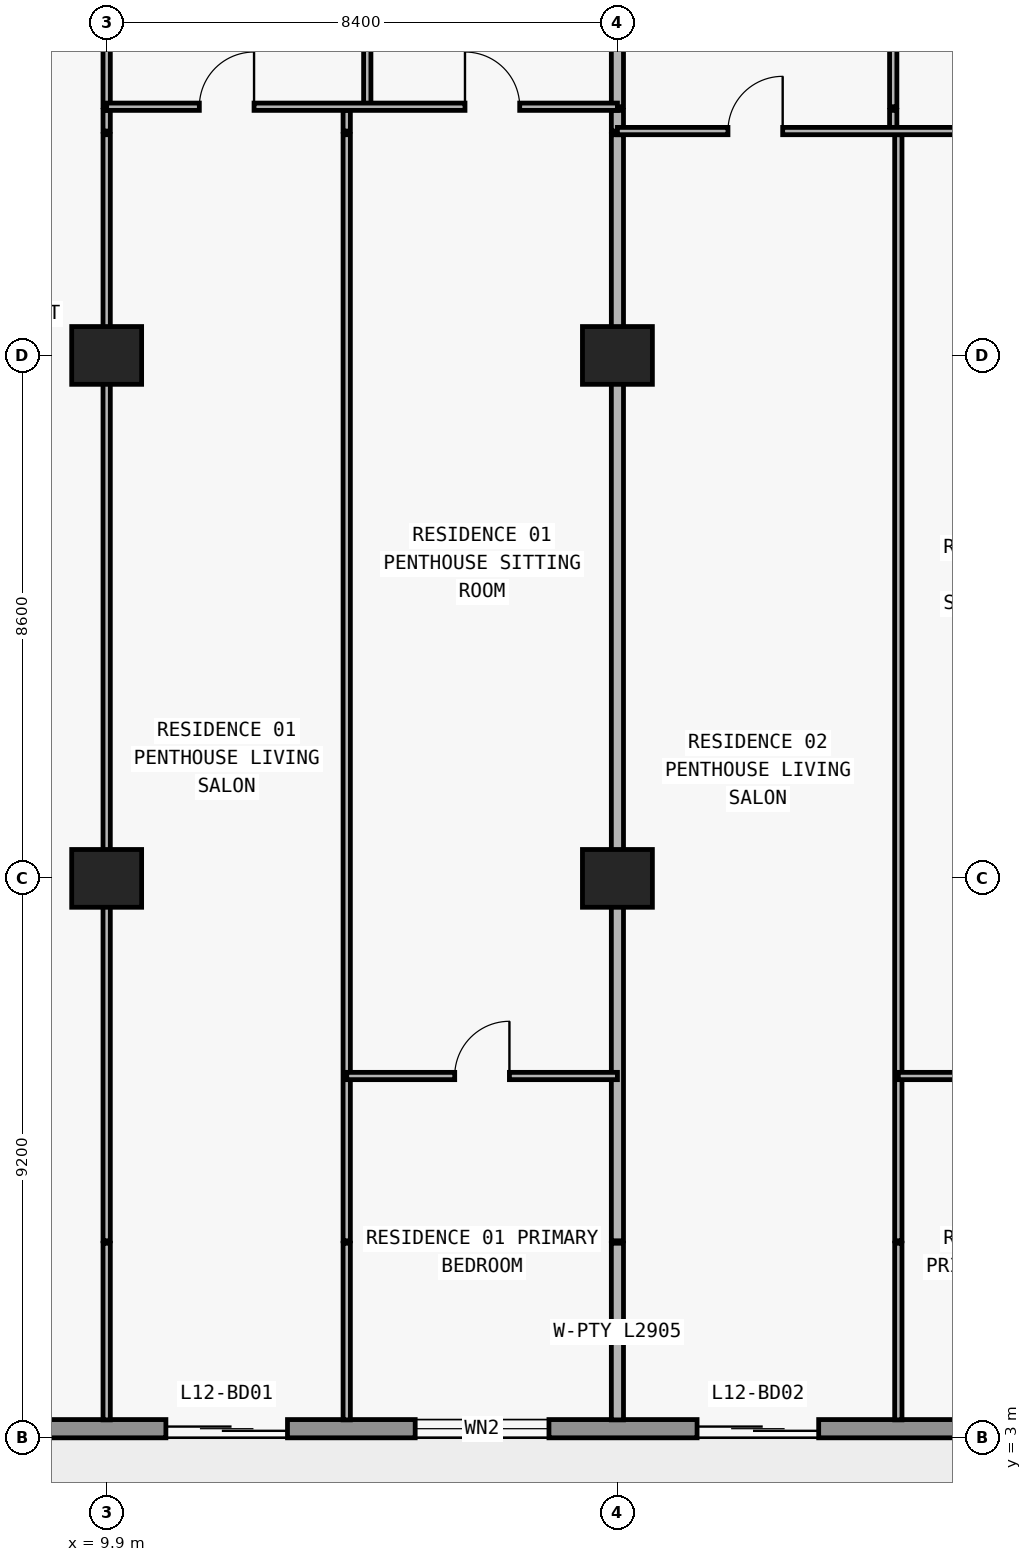
"""IFC4 building model, lengths in metres.
Left out: names, types, materials, properties, quantities, classifications, styles, units other than length and angle.
Written with IfcOpenShell. Run it as: python <this file> out.ifc"""

import sys

from ifc_helpers import new_model, si_unit, direction, frame, frame_2d, origin, origin_2d, place, context, subcontext, project, spatial, rectangle, extrude, element, fill, save


model = new_model("IFC4")
c1 = context("Model", 3, precision=1e-05, world=origin(), true_north=direction((0.0, 1.0)))
c2 = subcontext(c1, "Body", "Model", "MODEL_VIEW")
j1 = project(units=[si_unit("LENGTHUNIT", "METRE"), si_unit("PLANEANGLEUNIT", "RADIAN")], contexts=[c1])
p1 = place(None, origin())
s1 = spatial("IfcSite", under=j1, at=p1, CompositionType="ELEMENT")
p2 = place(p1, origin())
s2 = spatial("IfcBuilding", under=s1, at=p2, CompositionType="ELEMENT")
p3 = place(p2, frame((0.0, 0.0, 49.8)))
s3 = spatial("IfcBuildingStorey", under=s2, at=p3, CompositionType="ELEMENT", Elevation=49.8)
for number, where, z_axis, x_axis in (
    (1, (9.9, 12.2, 0.0), (0.0, 0.0, 1.0), (1.0, 0.0, 0.0)),
    (2, (18.3, 12.2, 0.0), (0.0, 0.0, 1.0), (1.0, 0.0, 0.0)),
    (3, (9.9, 20.8, 0.0), (0.0, 0.0, 1.0), (1.0, 0.0, 0.0)),
    (4, (18.3, 20.8, 0.0), (0.0, 0.0, 1.0), (1.0, 0.0, 0.0)),
):
    element("IfcColumn", number, at=place(p3, frame(where, z_axis=z_axis, x_axis=x_axis)), inside=s3, PredefinedType="COLUMN", context=c2, shape_type="SweptSolid", body=[
        extrude(rectangle(XDim=1.15, YDim=0.95, at=origin_2d()), origin(), (0.0, 0.0, 1.0), 3.05),
    ])
p4 = place(p3, frame((72.7, 3.15, 0.0), z_axis=(0.0, 0.0, 1.0), x_axis=(-1.0, 0.0, 0.0)))
e5 = element("IfcWall", 5, at=p4, inside=s3, PredefinedType="STANDARD", context=c2, shape_type="SweptSolid", body=[
    extrude(rectangle(XDim=67.6, YDim=0.3, at=frame_2d((33.8, 0.0))), origin(), (0.0, 0.0, 1.0), 3.05),
])
p5 = place(p4, frame((59.826, 0.0, 0.0)))
e6 = element("IfcOpeningElement", 6, at=p5, cuts=e5, PredefinedType="OPENING", context=c2, shape_type="SweptSolid", body=[
    extrude(rectangle(XDim=2.0, YDim=2.3, at=frame_2d((1.0, 1.15))), frame((0.0, 0.16, 0.0), z_axis=(0.0, -1.0, 0.0), x_axis=(1.0, 0.0, 0.0)), (0.0, 0.0, 1.0), 0.32),
])
p6 = place(p4, frame((55.526, 0.0, 0.85)))
e7 = element("IfcOpeningElement", 7, at=p6, cuts=e5, PredefinedType="OPENING", context=c2, shape_type="SweptSolid", body=[
    extrude(rectangle(XDim=2.2, YDim=1.55, at=frame_2d((1.1, 0.775))), frame((0.0, 0.16, 0.0), z_axis=(0.0, -1.0, 0.0), x_axis=(1.0, 0.0, 0.0)), (0.0, 0.0, 1.0), 0.32),
])
p7 = place(p4, frame((51.09, 0.0, 0.0)))
e8 = element("IfcOpeningElement", 8, at=p7, cuts=e5, PredefinedType="OPENING", context=c2, shape_type="SweptSolid", body=[
    extrude(rectangle(XDim=2.0, YDim=2.3, at=frame_2d((1.0, 1.15))), frame((0.0, 0.16, 0.0), z_axis=(0.0, -1.0, 0.0), x_axis=(1.0, 0.0, 0.0)), (0.0, 0.0, 1.0), 0.32),
])
p8 = place(p4, frame((46.99, 0.0, 0.85)))
e9 = element("IfcOpeningElement", 9, at=p8, cuts=e5, PredefinedType="OPENING", context=c2, shape_type="SweptSolid", body=[
    extrude(rectangle(XDim=1.8, YDim=1.55, at=frame_2d((0.9, 0.775))), frame((0.0, 0.16, 0.0), z_axis=(0.0, -1.0, 0.0), x_axis=(1.0, 0.0, 0.0)), (0.0, 0.0, 1.0), 0.32),
])
p9 = place(p4, frame((43.09, 0.0, 0.0)))
e10 = element("IfcOpeningElement", 10, at=p9, cuts=e5, PredefinedType="OPENING", context=c2, shape_type="SweptSolid", body=[
    extrude(rectangle(XDim=2.0, YDim=2.3, at=frame_2d((1.0, 1.15))), frame((0.0, 0.16, 0.0), z_axis=(0.0, -1.0, 0.0), x_axis=(1.0, 0.0, 0.0)), (0.0, 0.0, 1.0), 0.32),
])
p10 = place(p4, frame((38.41, 0.0, 0.65)))
e11 = element("IfcOpeningElement", 11, at=p10, cuts=e5, PredefinedType="OPENING", context=c2, shape_type="SweptSolid", body=[
    extrude(rectangle(XDim=2.6, YDim=1.85, at=frame_2d((1.3, 0.925))), frame((0.0, 0.16, 0.0), z_axis=(0.0, -1.0, 0.0), x_axis=(1.0, 0.0, 0.0)), (0.0, 0.0, 1.0), 0.32),
])
p11 = place(p4, frame((32.7, 0.0, 0.85)))
e12 = element("IfcOpeningElement", 12, at=p11, cuts=e5, PredefinedType="OPENING", context=c2, shape_type="SweptSolid", body=[
    extrude(rectangle(XDim=2.2, YDim=1.55, at=frame_2d((1.1, 0.775))), frame((0.0, 0.16, 0.0), z_axis=(0.0, -1.0, 0.0), x_axis=(1.0, 0.0, 0.0)), (0.0, 0.0, 1.0), 0.32),
])
p12 = place(p4, frame((24.7, 0.0, 0.85)))
e13 = element("IfcOpeningElement", 13, at=p12, cuts=e5, PredefinedType="OPENING", context=c2, shape_type="SweptSolid", body=[
    extrude(rectangle(XDim=2.2, YDim=1.55, at=frame_2d((1.1, 0.775))), frame((0.0, 0.16, 0.0), z_axis=(0.0, -1.0, 0.0), x_axis=(1.0, 0.0, 0.0)), (0.0, 0.0, 1.0), 0.32),
])
p13 = place(p4, frame((18.29, 0.0, 0.0)))
e14 = element("IfcOpeningElement", 14, at=p13, cuts=e5, PredefinedType="OPENING", context=c2, shape_type="SweptSolid", body=[
    extrude(rectangle(XDim=2.0, YDim=2.3, at=frame_2d((1.0, 1.15))), frame((0.0, 0.16, 0.0), z_axis=(0.0, -1.0, 0.0), x_axis=(1.0, 0.0, 0.0)), (0.0, 0.0, 1.0), 0.32),
])
p14 = place(p4, frame((14.19, 0.0, 0.85)))
e15 = element("IfcOpeningElement", 15, at=p14, cuts=e5, PredefinedType="OPENING", context=c2, shape_type="SweptSolid", body=[
    extrude(rectangle(XDim=1.8, YDim=1.55, at=frame_2d((0.9, 0.775))), frame((0.0, 0.16, 0.0), z_axis=(0.0, -1.0, 0.0), x_axis=(1.0, 0.0, 0.0)), (0.0, 0.0, 1.0), 0.32),
])
p15 = place(p4, frame((10.226, 0.0, 0.0)))
e16 = element("IfcOpeningElement", 16, at=p15, cuts=e5, PredefinedType="OPENING", context=c2, shape_type="SweptSolid", body=[
    extrude(rectangle(XDim=2.0, YDim=2.3, at=frame_2d((1.0, 1.15))), frame((0.0, 0.16, 0.0), z_axis=(0.0, -1.0, 0.0), x_axis=(1.0, 0.0, 0.0)), (0.0, 0.0, 1.0), 0.32),
])
p16 = place(p4, frame((5.926, 0.0, 0.85)))
e17 = element("IfcOpeningElement", 17, at=p16, cuts=e5, PredefinedType="OPENING", context=c2, shape_type="SweptSolid", body=[
    extrude(rectangle(XDim=2.2, YDim=1.55, at=frame_2d((1.1, 0.775))), frame((0.0, 0.16, 0.0), z_axis=(0.0, -1.0, 0.0), x_axis=(1.0, 0.0, 0.0)), (0.0, 0.0, 1.0), 0.32),
])
p17 = place(p3, frame((9.9, 3.295, 0.0), z_axis=(0.0, 0.0, 1.0), x_axis=(0.0, 1.0, 0.0)))
e18 = element("IfcWall", 18, at=p17, inside=s3, PredefinedType="PARTITIONING", context=c2, shape_type="SweptSolid", body=[
    extrude(rectangle(XDim=2.905, YDim=0.12, at=frame_2d((1.453, 0.0))), origin(), (0.0, 0.0, 1.0), 3.05),
])
p18 = place(p3, frame((9.9, 6.24, 0.0), z_axis=(0.0, 0.0, 1.0), x_axis=(0.0, 1.0, 0.0)))
e19 = element("IfcWall", 19, at=p18, inside=s3, PredefinedType="PARTITIONING", context=c2, shape_type="SweptSolid", body=[
    extrude(rectangle(XDim=18.19, YDim=0.12, at=frame_2d((9.095, 0.0))), origin(), (0.0, 0.0, 1.0), 2.11),
])
p19 = place(p3, frame((9.9, 24.49, 0.0), z_axis=(0.0, 0.0, 1.0), x_axis=(0.0, 1.0, 0.0)))
e20 = element("IfcWall", 20, at=p19, inside=s3, PredefinedType="PARTITIONING", context=c2, shape_type="SweptSolid", body=[
    extrude(rectangle(XDim=0.34, YDim=0.12, at=frame_2d((0.17, 0.0))), origin(), (0.0, 0.0, 1.0), 2.11),
])
p20 = place(p3, frame((9.9, 24.89, 0.0), z_axis=(0.0, 0.0, 1.0), x_axis=(0.0, 1.0, 0.0)))
e21 = element("IfcWall", 21, at=p20, inside=s3, PredefinedType="PARTITIONING", context=c2, shape_type="SweptSolid", body=[
    extrude(rectangle(XDim=4.69, YDim=0.12, at=frame_2d((2.345, 0.0))), origin(), (0.0, 0.0, 1.0), 2.11),
])
p21 = place(p20, frame((1.895, 0.0, 0.0)))
e22 = element("IfcOpeningElement", 22, at=p21, cuts=e21, PredefinedType="OPENING", context=c2, shape_type="SweptSolid", body=[
    extrude(rectangle(XDim=0.9, YDim=2.06, at=frame_2d((0.45, 1.03))), frame((0.0, 0.07, 0.0), z_axis=(0.0, -1.0, 0.0), x_axis=(1.0, 0.0, 0.0)), (0.0, 0.0, 1.0), 0.14),
])
p22 = place(p3, frame((13.848, 3.295, 0.0), z_axis=(0.0, 0.0, 1.0), x_axis=(0.0, 1.0, 0.0)))
e23 = element("IfcWall", 23, at=p22, inside=s3, PredefinedType="PARTITIONING", context=c2, shape_type="SweptSolid", body=[
    extrude(rectangle(XDim=2.905, YDim=0.12, at=frame_2d((1.453, 0.0))), origin(), (0.0, 0.0, 1.0), 3.05),
])
p23 = place(p3, frame((13.848, 6.24, 0.0), z_axis=(0.0, 0.0, 1.0), x_axis=(0.0, 1.0, 0.0)))
e24 = element("IfcWall", 24, at=p23, inside=s3, PredefinedType="PARTITIONING", context=c2, shape_type="SweptSolid", body=[
    extrude(rectangle(XDim=18.19, YDim=0.12, at=frame_2d((9.095, 0.0))), origin(), (0.0, 0.0, 1.0), 3.05),
])
p24 = place(p3, frame((13.848, 24.49, 0.0), z_axis=(0.0, 0.0, 1.0), x_axis=(0.0, 1.0, 0.0)))
e25 = element("IfcWall", 25, at=p24, inside=s3, PredefinedType="PARTITIONING", context=c2, shape_type="SweptSolid", body=[
    extrude(rectangle(XDim=0.34, YDim=0.12, at=frame_2d((0.17, 0.0))), origin(), (0.0, 0.0, 1.0), 3.05),
])
p25 = place(p3, frame((14.186, 24.89, 0.0), z_axis=(0.0, 0.0, 1.0), x_axis=(0.0, 1.0, 0.0)))
e26 = element("IfcWall", 26, at=p25, inside=s3, PredefinedType="PARTITIONING", context=c2, shape_type="SweptSolid", body=[
    extrude(rectangle(XDim=4.69, YDim=0.12, at=frame_2d((2.345, 0.0))), origin(), (0.0, 0.0, 1.0), 3.05),
])
p26 = place(p25, frame((1.895, 0.0, 0.0)))
e27 = element("IfcOpeningElement", 27, at=p26, cuts=e26, PredefinedType="OPENING", context=c2, shape_type="SweptSolid", body=[
    extrude(rectangle(XDim=0.9, YDim=2.15, at=frame_2d((0.45, 1.075))), frame((0.0, 0.07, 0.0), z_axis=(0.0, -1.0, 0.0), x_axis=(1.0, 0.0, 0.0)), (0.0, 0.0, 1.0), 0.14),
])
p27 = place(p3, frame((18.3, 3.295, 0.0), z_axis=(0.0, 0.0, 1.0), x_axis=(0.0, 1.0, 0.0)))
e28 = element("IfcWall", 28, at=p27, inside=s3, PredefinedType="PARTITIONING", context=c2, shape_type="SweptSolid", body=[
    extrude(rectangle(XDim=2.905, YDim=0.2, at=frame_2d((1.453, 0.0))), origin(), (0.0, 0.0, 1.0), 3.05),
])
p28 = place(p3, frame((18.3, 6.24, 0.0), z_axis=(0.0, 0.0, 1.0), x_axis=(0.0, 1.0, 0.0)))
e29 = element("IfcWall", 29, at=p28, inside=s3, PredefinedType="PARTITIONING", context=c2, shape_type="SweptSolid", body=[
    extrude(rectangle(XDim=18.19, YDim=0.2, at=frame_2d((9.095, 0.0))), origin(), (0.0, 0.0, 1.0), 2.11),
])
p29 = place(p3, frame((18.3, 24.49, 0.0), z_axis=(0.0, 0.0, 1.0), x_axis=(0.0, 1.0, 0.0)))
e30 = element("IfcWall", 30, at=p29, inside=s3, PredefinedType="PARTITIONING", context=c2, shape_type="SweptSolid", body=[
    extrude(rectangle(XDim=0.34, YDim=0.2, at=frame_2d((0.17, 0.0))), origin(), (0.0, 0.0, 1.0), 2.11),
])
p30 = place(p3, frame((18.3, 24.89, 0.0), z_axis=(0.0, 0.0, 1.0), x_axis=(0.0, 1.0, 0.0)))
e31 = element("IfcWall", 31, at=p30, inside=s3, PredefinedType="PARTITIONING", context=c2, shape_type="SweptSolid", body=[
    extrude(rectangle(XDim=4.69, YDim=0.2, at=frame_2d((2.345, 0.0))), origin(), (0.0, 0.0, 1.0), 2.11),
])
p31 = place(p3, frame((22.836, 24.49, 0.0), z_axis=(0.0, 0.0, 1.0), x_axis=(0.0, 1.0, 0.0)))
e32 = element("IfcWall", 32, at=p31, inside=s3, PredefinedType="PARTITIONING", context=c2, shape_type="SweptSolid", body=[
    extrude(rectangle(XDim=0.34, YDim=0.12, at=frame_2d((0.17, 0.0))), origin(), (0.0, 0.0, 1.0), 3.05),
])
p32 = place(p3, frame((22.836, 24.89, 0.0), z_axis=(0.0, 0.0, 1.0), x_axis=(0.0, 1.0, 0.0)))
e33 = element("IfcWall", 33, at=p32, inside=s3, PredefinedType="PARTITIONING", context=c2, shape_type="SweptSolid", body=[
    extrude(rectangle(XDim=4.69, YDim=0.12, at=frame_2d((2.345, 0.0))), origin(), (0.0, 0.0, 1.0), 3.05),
])
p33 = place(p32, frame((1.895, 0.0, 0.0)))
e34 = element("IfcOpeningElement", 34, at=p33, cuts=e33, PredefinedType="OPENING", context=c2, shape_type="SweptSolid", body=[
    extrude(rectangle(XDim=0.9, YDim=2.15, at=frame_2d((0.45, 1.075))), frame((0.0, 0.07, 0.0), z_axis=(0.0, -1.0, 0.0), x_axis=(1.0, 0.0, 0.0)), (0.0, 0.0, 1.0), 0.14),
])
p34 = place(p3, frame((22.92, 3.295, 0.0), z_axis=(0.0, 0.0, 1.0), x_axis=(0.0, 1.0, 0.0)))
e35 = element("IfcWall", 35, at=p34, inside=s3, PredefinedType="PARTITIONING", context=c2, shape_type="SweptSolid", body=[
    extrude(rectangle(XDim=2.905, YDim=0.12, at=frame_2d((1.453, 0.0))), origin(), (0.0, 0.0, 1.0), 3.05),
])
p35 = place(p3, frame((22.92, 6.24, 0.0), z_axis=(0.0, 0.0, 1.0), x_axis=(0.0, 1.0, 0.0)))
e36 = element("IfcWall", 36, at=p35, inside=s3, PredefinedType="PARTITIONING", context=c2, shape_type="SweptSolid", body=[
    extrude(rectangle(XDim=18.19, YDim=0.12, at=frame_2d((9.095, 0.0))), origin(), (0.0, 0.0, 1.0), 3.05),
])
p36 = place(p3, frame((13.848, 8.95, 0.0), z_axis=(0.0, 0.0, 1.0), x_axis=(1.0, 0.0, 0.0)))
e37 = element("IfcWall", 37, at=p36, inside=s3, PredefinedType="PARTITIONING", context=c2, shape_type="SweptSolid", body=[
    extrude(rectangle(XDim=4.452, YDim=0.12, at=frame_2d((2.226, 0.0))), origin(), (0.0, 0.0, 1.0), 3.05),
])
p37 = place(p36, frame((1.776, 0.0, 0.0)))
e38 = element("IfcOpeningElement", 38, at=p37, cuts=e37, PredefinedType="OPENING", context=c2, shape_type="SweptSolid", body=[
    extrude(rectangle(XDim=0.9, YDim=2.15, at=frame_2d((0.45, 1.075))), frame((0.0, 0.07, 0.0), z_axis=(0.0, -1.0, 0.0), x_axis=(1.0, 0.0, 0.0)), (0.0, 0.0, 1.0), 0.14),
])
p38 = place(p3, frame((22.92, 8.95, 0.0), z_axis=(0.0, 0.0, 1.0), x_axis=(1.0, 0.0, 0.0)))
e39 = element("IfcWall", 39, at=p38, inside=s3, PredefinedType="PARTITIONING", context=c2, shape_type="SweptSolid", body=[
    extrude(rectangle(XDim=3.78, YDim=0.12, at=frame_2d((1.89, 0.0))), origin(), (0.0, 0.0, 1.0), 3.05),
])
p39 = place(p38, frame((1.44, 0.0, 0.0)))
e40 = element("IfcOpeningElement", 40, at=p39, cuts=e39, PredefinedType="OPENING", context=c2, shape_type="SweptSolid", body=[
    extrude(rectangle(XDim=0.9, YDim=2.15, at=frame_2d((0.45, 1.075))), frame((0.0, 0.07, 0.0), z_axis=(0.0, -1.0, 0.0), x_axis=(1.0, 0.0, 0.0)), (0.0, 0.0, 1.0), 0.14),
])
p40 = place(p3, frame((18.3, 24.49, 0.0), z_axis=(0.0, 0.0, 1.0), x_axis=(1.0, 0.0, 0.0)))
e41 = element("IfcWall", 41, at=p40, inside=s3, PredefinedType="PARTITIONING", context=c2, shape_type="SweptSolid", body=[
    extrude(rectangle(XDim=8.13, YDim=0.12, at=frame_2d((4.065, 0.0))), origin(), (0.0, 0.0, 1.0), 3.05),
])
p41 = place(p40, frame((1.818, 0.0, 0.0)))
e42 = element("IfcOpeningElement", 42, at=p41, cuts=e41, PredefinedType="OPENING", context=c2, shape_type="SweptSolid", body=[
    extrude(rectangle(XDim=0.9, YDim=2.15, at=frame_2d((0.45, 1.075))), frame((0.0, 0.07, 0.0), z_axis=(0.0, -1.0, 0.0), x_axis=(1.0, 0.0, 0.0)), (0.0, 0.0, 1.0), 0.14),
])
p42 = place(p40, frame((5.925, 0.0, 0.0)))
e43 = element("IfcOpeningElement", 43, at=p42, cuts=e41, PredefinedType="OPENING", context=c2, shape_type="SweptSolid", body=[
    extrude(rectangle(XDim=0.9, YDim=2.15, at=frame_2d((0.45, 1.075))), frame((0.0, 0.07, 0.0), z_axis=(0.0, -1.0, 0.0), x_axis=(1.0, 0.0, 0.0)), (0.0, 0.0, 1.0), 0.14),
])
p43 = place(p3, frame((9.9, 24.89, 0.0), z_axis=(0.0, 0.0, 1.0), x_axis=(1.0, 0.0, 0.0)))
e44 = element("IfcWall", 44, at=p43, inside=s3, PredefinedType="PARTITIONING", context=c2, shape_type="SweptSolid", body=[
    extrude(rectangle(XDim=8.4, YDim=0.12, at=frame_2d((4.2, 0.0))), origin(), (0.0, 0.0, 1.0), 3.05),
])
p44 = place(p43, frame((1.524, 0.0, 0.0)))
e45 = element("IfcOpeningElement", 45, at=p44, cuts=e44, PredefinedType="OPENING", context=c2, shape_type="SweptSolid", body=[
    extrude(rectangle(XDim=0.9, YDim=2.15, at=frame_2d((0.45, 1.075))), frame((0.0, 0.07, 0.0), z_axis=(0.0, -1.0, 0.0), x_axis=(1.0, 0.0, 0.0)), (0.0, 0.0, 1.0), 0.14),
])
p45 = place(p43, frame((5.893, 0.0, 0.0)))
e46 = element("IfcOpeningElement", 46, at=p45, cuts=e44, PredefinedType="OPENING", context=c2, shape_type="SweptSolid", body=[
    extrude(rectangle(XDim=0.9, YDim=2.15, at=frame_2d((0.45, 1.075))), frame((0.0, 0.07, 0.0), z_axis=(0.0, -1.0, 0.0), x_axis=(1.0, 0.0, 0.0)), (0.0, 0.0, 1.0), 0.14),
])
p46 = place(p5, origin())
e47 = element("IfcDoor", 47, at=p46, inside=s3, OperationType="DOUBLE_DOOR_SLIDING", PredefinedType="DOOR", context=c2, shape_type="SweptSolid", body=[
    extrude(rectangle(XDim=2.0, YDim=2.3, at=frame_2d((1.0, 1.15))), frame((0.0, 0.025, 0.0), z_axis=(0.0, -1.0, 0.0), x_axis=(1.0, 0.0, 0.0)), (0.0, 0.0, 1.0), 0.05),
])
fill(e6, e47)
p47 = place(p6, origin())
e48 = element("IfcWindow", 48, at=p47, inside=s3, PartitioningType="SINGLE_PANEL", PredefinedType="WINDOW", context=c2, shape_type="SweptSolid", body=[
    extrude(rectangle(XDim=2.2, YDim=1.55, at=frame_2d((1.1, 0.775))), frame((0.0, 0.03, 0.0), z_axis=(0.0, -1.0, 0.0), x_axis=(1.0, 0.0, 0.0)), (0.0, 0.0, 1.0), 0.06),
])
fill(e7, e48)
p48 = place(p7, origin())
e49 = element("IfcDoor", 49, at=p48, inside=s3, OperationType="DOUBLE_DOOR_SLIDING", PredefinedType="DOOR", context=c2, shape_type="SweptSolid", body=[
    extrude(rectangle(XDim=2.0, YDim=2.3, at=frame_2d((1.0, 1.15))), frame((0.0, 0.025, 0.0), z_axis=(0.0, -1.0, 0.0), x_axis=(1.0, 0.0, 0.0)), (0.0, 0.0, 1.0), 0.05),
])
fill(e8, e49)
p49 = place(p44, origin())
e50 = element("IfcDoor", 50, at=p49, inside=s3, OperationType="SINGLE_SWING_RIGHT", PredefinedType="DOOR", context=c2, shape_type="SweptSolid", body=[
    extrude(rectangle(XDim=0.9, YDim=2.15, at=frame_2d((0.45, 1.075))), frame((0.0, 0.025, 0.0), z_axis=(0.0, -1.0, 0.0), x_axis=(1.0, 0.0, 0.0)), (0.0, 0.0, 1.0), 0.05),
])
fill(e45, e50)
p50 = place(p45, origin())
e51 = element("IfcDoor", 51, at=p50, inside=s3, OperationType="SINGLE_SWING_LEFT", PredefinedType="DOOR", context=c2, shape_type="SweptSolid", body=[
    extrude(rectangle(XDim=0.9, YDim=2.15, at=frame_2d((0.45, 1.075))), frame((0.0, 0.025, 0.0), z_axis=(0.0, -1.0, 0.0), x_axis=(1.0, 0.0, 0.0)), (0.0, 0.0, 1.0), 0.05),
])
fill(e46, e51)
p51 = place(p37, origin())
e52 = element("IfcDoor", 52, at=p51, inside=s3, OperationType="SINGLE_SWING_RIGHT", PredefinedType="DOOR", context=c2, shape_type="SweptSolid", body=[
    extrude(rectangle(XDim=0.9, YDim=2.15, at=frame_2d((0.45, 1.075))), frame((0.0, 0.025, 0.0), z_axis=(0.0, -1.0, 0.0), x_axis=(1.0, 0.0, 0.0)), (0.0, 0.0, 1.0), 0.05),
])
fill(e38, e52)
p52 = place(p41, origin())
e53 = element("IfcDoor", 53, at=p52, inside=s3, OperationType="SINGLE_SWING_RIGHT", PredefinedType="DOOR", context=c2, shape_type="SweptSolid", body=[
    extrude(rectangle(XDim=0.9, YDim=2.15, at=frame_2d((0.45, 1.075))), frame((0.0, 0.025, 0.0), z_axis=(0.0, -1.0, 0.0), x_axis=(1.0, 0.0, 0.0)), (0.0, 0.0, 1.0), 0.05),
])
fill(e42, e53)
save(model, sys.argv[1])
